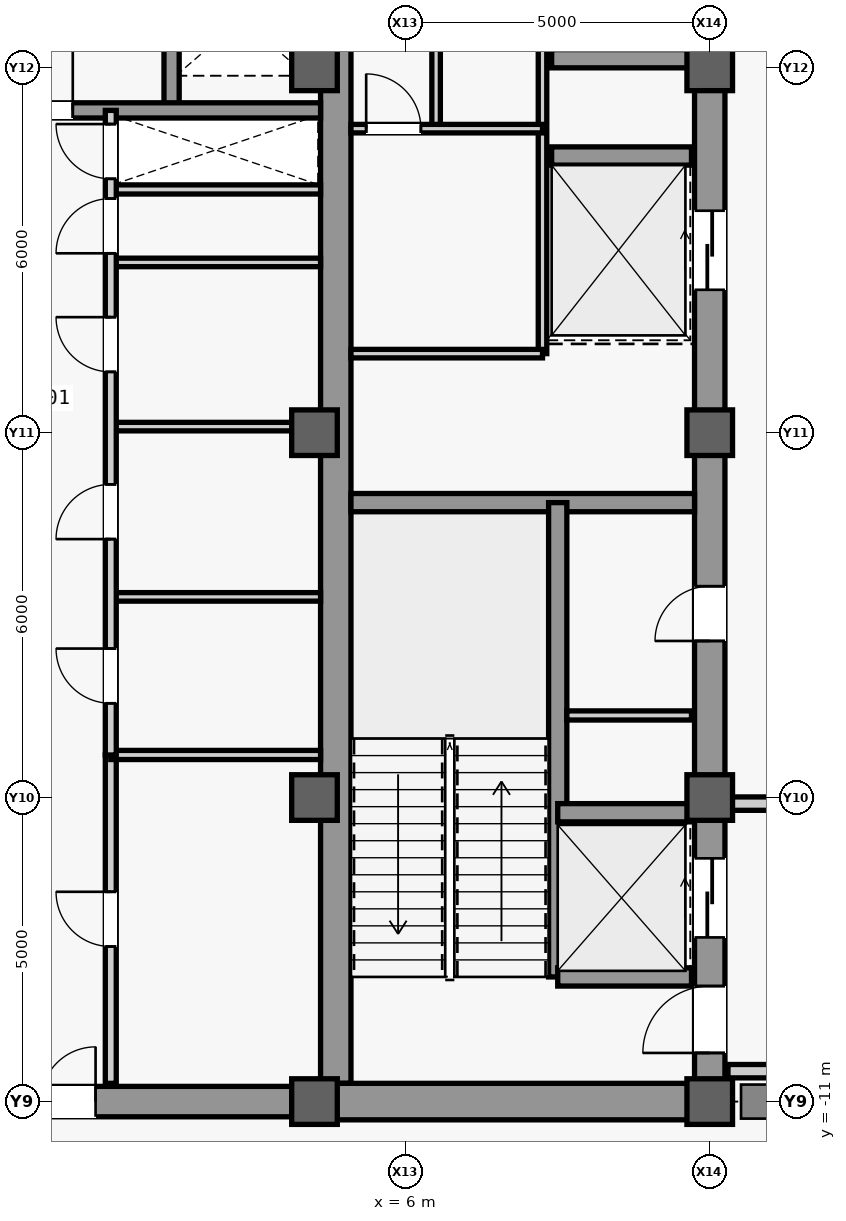
"""IFC4 building model, lengths in metres.
Left out: names, types, materials, properties, quantities, classifications, styles, units other than length and angle.
Written with IfcOpenShell. Run it as: python <this file> out.ifc"""

import sys

from ifc_helpers import new_model, si_unit, direction, frame, frame_2d, origin, origin_2d, place, context, subcontext, project, spatial, rectangle, extrude, source, transform, mapped, element, fill, save


model = new_model("IFC4")
c1 = context("Model", 3, precision=1e-05, world=origin(), true_north=direction((0.0, 1.0)))
c2 = subcontext(c1, "Body", "Model", "MODEL_VIEW")
j1 = project(units=[si_unit("LENGTHUNIT", "METRE"), si_unit("PLANEANGLEUNIT", "RADIAN")], contexts=[c1])
p1 = place(None, origin())
s1 = spatial("IfcSite", under=j1, at=p1, CompositionType="ELEMENT")
p2 = place(p1, origin())
s2 = spatial("IfcBuilding", under=s1, at=p2, CompositionType="ELEMENT")
p3 = place(p2, frame((0.0, 0.0, 268.3)))
s3 = spatial("IfcBuildingStorey", under=s2, at=p3, CompositionType="ELEMENT", Elevation=268.3)
m1 = source(origin(), c2, "Body", "SweptSolid", [
    extrude(rectangle(XDim=22.0, YDim=0.5, at=frame_2d((11.0, 0.0))), origin(), (0.0, 0.0, 1.0), 4.98),
])
p4 = place(p3, frame((11.0, -11.0, 0.0), z_axis=(0.0, 0.0, 1.0), x_axis=(0.0, 1.0, 0.0)))
e1 = element("IfcWall", 1, at=p4, inside=s3, PredefinedType="SHEAR", context=c2, shape_type="MappedRepresentation", body=[
    mapped(m1, transform((0.0, 0.0, 0.0), scale=1.0)),
])
m2 = source(origin(), c2, "Body", "SweptSolid", [
    extrude(rectangle(XDim=1.1, YDim=2.2, at=frame_2d((0.55, 1.1))), frame((0.0, 0.26, 0.0), z_axis=(0.0, -1.0, 0.0), x_axis=(1.0, 0.0, 0.0)), (0.0, 0.0, 1.0), 0.52),
])
p5 = place(p4, frame((0.8, 0.0, 0.0)))
e2 = element("IfcOpeningElement", 2, at=p5, cuts=e1, PredefinedType="OPENING", context=c2, shape_type="MappedRepresentation", body=[
    mapped(m2, transform((0.0, 0.0, 0.0), scale=1.0)),
])
m3 = source(origin(), c2, "Body", "SweptSolid", [
    extrude(rectangle(XDim=0.9, YDim=2.15, at=frame_2d((0.45, 1.075))), frame((0.0, 0.26, 0.0), z_axis=(0.0, -1.0, 0.0), x_axis=(1.0, 0.0, 0.0)), (0.0, 0.0, 1.0), 0.52),
])
p6 = place(p4, frame((7.575, 0.0, 0.0)))
e3 = element("IfcOpeningElement", 3, at=p6, cuts=e1, PredefinedType="OPENING", context=c2, shape_type="MappedRepresentation", body=[
    mapped(m3, transform((0.0, 0.0, 0.0), scale=1.0)),
])
m4 = source(origin(), c2, "Body", "SweptSolid", [
    extrude(rectangle(XDim=1.3, YDim=2.3, at=frame_2d((0.65, 1.15))), frame((0.0, 0.26, 0.0), z_axis=(0.0, -1.0, 0.0), x_axis=(1.0, 0.0, 0.0)), (0.0, 0.0, 1.0), 0.52),
])
p7 = place(p4, frame((2.7, 0.0, 0.0)))
e4 = element("IfcOpeningElement", 4, at=p7, cuts=e1, PredefinedType="OPENING", context=c2, shape_type="MappedRepresentation", body=[
    mapped(m4, transform((0.0, 0.0, 0.0), scale=1.0)),
])
p8 = place(p4, frame((13.35, 0.0, 0.0)))
e5 = element("IfcOpeningElement", 5, at=p8, cuts=e1, PredefinedType="OPENING", context=c2, shape_type="MappedRepresentation", body=[
    mapped(m4, transform((0.0, 0.0, 0.0), scale=1.0)),
])
m5 = source(origin(), c2, "Body", "SweptSolid", [
    extrude(rectangle(XDim=21.4, YDim=0.5, at=frame_2d((10.7, 0.0))), origin(), (0.0, 0.0, 1.0), 4.98),
])
p9 = place(p3, frame((4.85, -10.7, 0.0), z_axis=(0.0, 0.0, 1.0), x_axis=(0.0, 1.0, 0.0)))
e6 = element("IfcWall", 6, at=p9, inside=s3, PredefinedType="SHEAR", context=c2, shape_type="MappedRepresentation", body=[
    mapped(m5, transform((0.0, 0.0, 0.0), scale=1.0)),
])
m6 = source(origin(), c2, "Body", "SweptSolid", [
    extrude(rectangle(XDim=5.9, YDim=0.6, at=frame_2d((2.95, 0.0))), origin(), (0.0, 0.0, 1.0), 4.98),
])
p10 = place(p3, frame((4.85, -11.0, 0.0), z_axis=(0.0, 0.0, 1.0), x_axis=(1.0, 0.0, 0.0)))
e7 = element("IfcWall", 7, at=p10, inside=s3, PredefinedType="SHEAR", context=c2, shape_type="MappedRepresentation", body=[
    mapped(m6, transform((0.0, 0.0, 0.0), scale=1.0)),
])
m7 = source(origin(), c2, "Body", "SweptSolid", [
    extrude(rectangle(XDim=5.65, YDim=0.3, at=frame_2d((2.825, 0.0))), origin(), (0.0, 0.0, 1.0), 4.98),
])
p11 = place(p3, frame((5.1, -1.15, 0.0), z_axis=(0.0, 0.0, 1.0), x_axis=(1.0, 0.0, 0.0)))
e8 = element("IfcWall", 8, at=p11, inside=s3, PredefinedType="SHEAR", context=c2, shape_type="MappedRepresentation", body=[
    mapped(m7, transform((0.0, 0.0, 0.0), scale=1.0)),
])
m8 = source(origin(), c2, "Body", "SweptSolid", [
    extrude(rectangle(XDim=9.2, YDim=0.5, at=frame_2d((4.6, 0.0))), origin(), (0.0, 0.0, 1.0), 4.98),
])
p12 = place(p3, frame((-4.6, -11.0, 0.0), z_axis=(0.0, 0.0, 1.0), x_axis=(1.0, 0.0, 0.0)))
e9 = element("IfcWall", 9, at=p12, inside=s3, PredefinedType="SHEAR", context=c2, shape_type="MappedRepresentation", body=[
    mapped(m8, transform((0.0, 0.0, 0.0), scale=1.0)),
])
m9 = source(origin(), c2, "Body", "SweptSolid", [
    extrude(rectangle(XDim=1.8, YDim=2.25, at=frame_2d((0.9, 1.125))), frame((0.0, 0.26, 0.0), z_axis=(0.0, -1.0, 0.0), x_axis=(1.0, 0.0, 0.0)), (0.0, 0.0, 1.0), 0.52),
])
p13 = place(p12, frame((3.7, 0.0, 0.0)))
e10 = element("IfcOpeningElement", 10, at=p13, cuts=e9, PredefinedType="OPENING", context=c2, shape_type="MappedRepresentation", body=[
    mapped(m9, transform((0.0, 0.0, 0.0), scale=1.0)),
])
m10 = source(origin(), c2, "Body", "SweptSolid", [
    extrude(rectangle(XDim=0.75, YDim=0.75, at=origin_2d()), origin(), (0.0, 0.0, 1.0), 5.2),
])
for number, where, z_axis, x_axis in (
    (11, (4.5, -11.0, 0.0), (0.0, 0.0, 1.0), (1.0, 0.0, 0.0)),
    (12, (4.5, -6.0, 0.0), (0.0, 0.0, 1.0), (1.0, 0.0, 0.0)),
    (13, (4.5, 0.0, 0.0), (0.0, 0.0, 1.0), (1.0, 0.0, 0.0)),
    (14, (4.5, 6.0, 0.0), (0.0, 0.0, 1.0), (1.0, 0.0, 0.0)),
    (15, (11.0, -11.0, 0.0), (0.0, 0.0, 1.0), (1.0, 0.0, 0.0)),
    (16, (11.0, -6.0, 0.0), (0.0, 0.0, 1.0), (1.0, 0.0, 0.0)),
    (17, (11.0, 0.0, 0.0), (0.0, 0.0, 1.0), (1.0, 0.0, 0.0)),
    (18, (11.0, 6.0, 0.0), (0.0, 0.0, 1.0), (1.0, 0.0, 0.0)),
):
    element("IfcColumn", number, at=place(p3, frame(where, z_axis=z_axis, x_axis=x_axis)), inside=s3, PredefinedType="COLUMN", context=c2, shape_type="MappedRepresentation", body=[
        mapped(m10, transform((0.0, 0.0, 0.0), scale=1.0)),
    ])
m11 = source(origin(), c2, "Body", "SweptSolid", [
    extrude(rectangle(XDim=7.8, YDim=0.3, at=frame_2d((3.9, 0.0))), origin(), (0.0, 0.0, 1.0), 4.98),
])
p14 = place(p3, frame((8.5, -8.95, 0.0), z_axis=(0.0, 0.0, 1.0), x_axis=(0.0, 1.0, 0.0)))
e19 = element("IfcWall", 19, at=p14, inside=s3, PredefinedType="SHEAR", context=c2, shape_type="MappedRepresentation", body=[
    mapped(m11, transform((0.0, 0.0, 0.0), scale=1.0)),
])
m12 = source(origin(), c2, "Body", "SweptSolid", [
    extrude(rectangle(XDim=2.2, YDim=0.3, at=frame_2d((1.1, 0.0))), origin(), (0.0, 0.0, 1.0), 4.98),
])
for number, where, z_axis, x_axis in (
    (20, (8.5, -8.95, 0.0), (0.0, 0.0, 1.0), (1.0, 0.0, 0.0)),
    (21, (8.5, -6.25, 0.0), (0.0, 0.0, 1.0), (1.0, 0.0, 0.0)),
):
    element("IfcWall", number, at=place(p3, frame(where, z_axis=z_axis, x_axis=x_axis)), inside=s3, PredefinedType="SHEAR", context=c2, shape_type="MappedRepresentation", body=[
        mapped(m12, transform((0.0, 0.0, 0.0), scale=1.0)),
    ])
m13 = source(origin(), c2, "Body", "SweptSolid", [
    extrude(rectangle(XDim=2.3, YDim=0.3, at=frame_2d((1.15, 0.0))), origin(), (0.0, 0.0, 1.0), 4.98),
])
for number, where, z_axis, x_axis in (
    (22, (8.4, 4.55, 0.0), (0.0, 0.0, 1.0), (1.0, 0.0, 0.0)),
    (23, (8.4, 6.15, 0.0), (0.0, 0.0, 1.0), (1.0, 0.0, 0.0)),
):
    element("IfcWall", number, at=place(p3, frame(where, z_axis=z_axis, x_axis=x_axis)), inside=s3, PredefinedType="SHEAR", context=c2, shape_type="MappedRepresentation", body=[
        mapped(m13, transform((0.0, 0.0, 0.0), scale=1.0)),
    ])
m14 = source(origin(), c2, "Body", "SweptSolid", [
    extrude(rectangle(XDim=2.05, YDim=0.15, at=frame_2d((1.025, 0.0))), origin(), (0.0, 0.0, 1.0), 4.98),
])
p15 = place(p3, frame((8.65, -4.65, 0.0), z_axis=(0.0, 0.0, 1.0), x_axis=(1.0, 0.0, 0.0)))
e24 = element("IfcWall", 24, at=p15, inside=s3, PredefinedType="PARTITIONING", context=c2, shape_type="MappedRepresentation", body=[
    mapped(m14, transform((0.0, 0.0, 0.0), scale=1.0)),
])
m15 = source(origin(), c2, "Body", "SweptSolid", [
    extrude(rectangle(XDim=9.4, YDim=0.14, at=frame_2d((4.7, 0.0))), origin(), (0.0, 0.0, 1.0), 4.98),
])
p16 = place(p3, frame((8.25, 1.3, 0.0), z_axis=(0.0, 0.0, 1.0), x_axis=(0.0, 1.0, 0.0)))
e25 = element("IfcWall", 25, at=p16, inside=s3, PredefinedType="PARTITIONING", context=c2, shape_type="MappedRepresentation", body=[
    mapped(m15, transform((0.0, 0.0, 0.0), scale=1.0)),
])
m16 = source(origin(), c2, "Body", "SweptSolid", [
    extrude(rectangle(XDim=3.15, YDim=0.14, at=frame_2d((1.575, 0.0))), origin(), (0.0, 0.0, 1.0), 4.98),
])
p17 = place(p3, frame((5.1, 1.3, 0.0), z_axis=(0.0, 0.0, 1.0), x_axis=(1.0, 0.0, 0.0)))
e26 = element("IfcWall", 26, at=p17, inside=s3, PredefinedType="PARTITIONING", context=c2, shape_type="MappedRepresentation", body=[
    mapped(m16, transform((0.0, 0.0, 0.0), scale=1.0)),
])
m17 = source(origin(), c2, "Body", "SweptSolid", [
    extrude(rectangle(XDim=5.7, YDim=0.14, at=frame_2d((2.85, 0.0))), origin(), (0.0, 0.0, 1.0), 4.98),
])
p18 = place(p3, frame((6.5, 5.0, 0.0), z_axis=(0.0, 0.0, 1.0), x_axis=(0.0, 1.0, 0.0)))
e27 = element("IfcWall", 27, at=p18, inside=s3, PredefinedType="PARTITIONING", context=c2, shape_type="MappedRepresentation", body=[
    mapped(m17, transform((0.0, 0.0, 0.0), scale=1.0)),
])
m18 = source(origin(), c2, "Body", "SweptSolid", [
    extrude(rectangle(XDim=0.9, YDim=2.15, at=frame_2d((0.45, 1.075))), frame((0.0, 0.08, 0.0), z_axis=(0.0, -1.0, 0.0), x_axis=(1.0, 0.0, 0.0)), (0.0, 0.0, 1.0), 0.16),
])
p19 = place(p18, frame((2.05, 0.0, 0.0)))
e28 = element("IfcOpeningElement", 28, at=p19, cuts=e27, PredefinedType="OPENING", context=c2, shape_type="MappedRepresentation", body=[
    mapped(m18, transform((0.0, 0.0, 0.0), scale=1.0)),
])
p20 = place(p3, frame((5.1, 5.0, 0.0), z_axis=(0.0, 0.0, 1.0), x_axis=(1.0, 0.0, 0.0)))
e29 = element("IfcWall", 29, at=p20, inside=s3, PredefinedType="PARTITIONING", context=c2, shape_type="MappedRepresentation", body=[
    mapped(m16, transform((0.0, 0.0, 0.0), scale=1.0)),
])
p21 = place(p20, frame((0.25, 0.0, 0.0)))
e30 = element("IfcOpeningElement", 30, at=p21, cuts=e29, PredefinedType="OPENING", context=c2, shape_type="MappedRepresentation", body=[
    mapped(m18, transform((0.0, 0.0, 0.0), scale=1.0)),
])
m19 = source(origin(), c2, "Body", "SweptSolid", [
    extrude(rectangle(XDim=4.05, YDim=0.22, at=frame_2d((2.025, 0.0))), origin(), (0.0, 0.0, 1.0), 4.98),
])
p22 = place(p3, frame((11.3, -10.5, 0.0), z_axis=(0.0, 0.0, 1.0), x_axis=(1.0, 0.0, 0.0)))
e31 = element("IfcWall", 31, at=p22, inside=s3, PredefinedType="PARTITIONING", context=c2, shape_type="MappedRepresentation", body=[
    mapped(m19, transform((0.0, 0.0, 0.0), scale=1.0)),
])
m20 = source(origin(), c2, "Body", "SweptSolid", [
    extrude(rectangle(XDim=4.05, YDim=0.22, at=frame_2d((2.025, 0.0))), origin(), (0.0, 0.0, 1.0), 4.285),
])
p23 = place(p3, frame((11.3, -6.1, 0.0), z_axis=(0.0, 0.0, 1.0), x_axis=(1.0, 0.0, 0.0)))
e32 = element("IfcWall", 32, at=p23, inside=s3, PredefinedType="PARTITIONING", context=c2, shape_type="MappedRepresentation", body=[
    mapped(m20, transform((0.0, 0.0, 0.0), scale=1.0)),
])
m21 = source(origin(), c2, "Body", "SweptSolid", [
    extrude(rectangle(XDim=3.45, YDim=0.15, at=frame_2d((1.725, 0.0))), origin(), (0.0, 0.0, 1.0), 4.98),
])
p24 = place(p3, frame((1.15, 4.0, 0.0), z_axis=(0.0, 0.0, 1.0), x_axis=(1.0, 0.0, 0.0)))
e33 = element("IfcWall", 33, at=p24, inside=s3, PredefinedType="PARTITIONING", context=c2, shape_type="MappedRepresentation", body=[
    mapped(m21, transform((0.0, 0.0, 0.0), scale=1.0)),
])
m22 = source(origin(), c2, "Body", "SweptSolid", [
    extrude(rectangle(XDim=5.4, YDim=0.18, at=frame_2d((2.7, 0.0))), origin(), (0.0, 0.0, 1.0), 4.98),
])
p25 = place(p3, frame((1.15, -10.7, 0.0), z_axis=(0.0, 0.0, 1.0), x_axis=(0.0, 1.0, 0.0)))
e34 = element("IfcWall", 34, at=p25, inside=s3, PredefinedType="PARTITIONING", context=c2, shape_type="MappedRepresentation", body=[
    mapped(m22, transform((0.0, 0.0, 0.0), scale=1.0)),
])
m23 = source(origin(), c2, "Body", "SweptSolid", [
    extrude(rectangle(XDim=0.9, YDim=2.15, at=frame_2d((0.45, 1.075))), frame((0.0, 0.1, 0.0), z_axis=(0.0, -1.0, 0.0), x_axis=(1.0, 0.0, 0.0)), (0.0, 0.0, 1.0), 0.2),
])
p26 = place(p25, frame((2.25, 0.0, 0.0)))
e35 = element("IfcOpeningElement", 35, at=p26, cuts=e34, PredefinedType="OPENING", context=c2, shape_type="MappedRepresentation", body=[
    mapped(m23, transform((0.0, 0.0, 0.0), scale=1.0)),
])
p27 = place(p3, frame((1.15, -5.3, 0.0), z_axis=(0.0, 0.0, 1.0), x_axis=(1.0, 0.0, 0.0)))
e36 = element("IfcWall", 36, at=p27, inside=s3, PredefinedType="PARTITIONING", context=c2, shape_type="MappedRepresentation", body=[
    mapped(m21, transform((0.0, 0.0, 0.0), scale=1.0)),
])
m24 = source(origin(), c2, "Body", "SweptSolid", [
    extrude(rectangle(XDim=5.4, YDim=0.25, at=frame_2d((2.7, 0.0))), origin(), (0.0, 0.0, 1.0), 4.98),
])
p28 = place(p3, frame((2.15, 5.3, 0.0), z_axis=(0.0, 0.0, 1.0), x_axis=(0.0, 1.0, 0.0)))
e37 = element("IfcWall", 37, at=p28, inside=s3, PredefinedType="SHEAR", context=c2, shape_type="MappedRepresentation", body=[
    mapped(m24, transform((0.0, 0.0, 0.0), scale=1.0)),
])
m25 = source(origin(), c2, "Body", "SweptSolid", [
    extrude(rectangle(XDim=9.2, YDim=0.25, at=frame_2d((4.6, 0.0))), origin(), (0.0, 0.0, 1.0), 4.98),
])
p29 = place(p3, frame((-4.6, 5.3, 0.0), z_axis=(0.0, 0.0, 1.0), x_axis=(1.0, 0.0, 0.0)))
e38 = element("IfcWall", 38, at=p29, inside=s3, PredefinedType="SHEAR", context=c2, shape_type="MappedRepresentation", body=[
    mapped(m25, transform((0.0, 0.0, 0.0), scale=1.0)),
])
m26 = source(origin(), c2, "Body", "SweptSolid", [
    extrude(rectangle(XDim=1.05, YDim=2.2, at=frame_2d((0.525, 1.1))), frame((0.0, 0.135, 0.0), z_axis=(0.0, -1.0, 0.0), x_axis=(1.0, 0.0, 0.0)), (0.0, 0.0, 1.0), 0.27),
])
p30 = place(p29, frame((4.075, 0.0, 0.0)))
e39 = element("IfcOpeningElement", 39, at=p30, cuts=e38, PredefinedType="OPENING", context=c2, shape_type="MappedRepresentation", body=[
    mapped(m26, transform((0.0, 0.0, 0.0), scale=1.0)),
])
m27 = source(origin(), c2, "Body", "SweptSolid", [
    extrude(rectangle(XDim=3.45, YDim=0.14, at=frame_2d((1.725, 0.0))), origin(), (0.0, 0.0, 1.0), 4.98),
])
p31 = place(p3, frame((1.15, -2.7, 0.0), z_axis=(0.0, 0.0, 1.0), x_axis=(1.0, 0.0, 0.0)))
e40 = element("IfcWall", 40, at=p31, inside=s3, PredefinedType="PARTITIONING", context=c2, shape_type="MappedRepresentation", body=[
    mapped(m27, transform((0.0, 0.0, 0.0), scale=1.0)),
])
m28 = source(origin(), c2, "Body", "SweptSolid", [
    extrude(rectangle(XDim=3.45, YDim=0.14, at=frame_2d((1.725, 0.0))), origin(), (0.0, 0.0, 1.0), 4.285),
])
p32 = place(p3, frame((1.15, 0.1, 0.0), z_axis=(0.0, 0.0, 1.0), x_axis=(1.0, 0.0, 0.0)))
e41 = element("IfcWall", 41, at=p32, inside=s3, PredefinedType="PARTITIONING", context=c2, shape_type="MappedRepresentation", body=[
    mapped(m28, transform((0.0, 0.0, 0.0), scale=1.0)),
])
p33 = place(p3, frame((1.15, 2.8, 0.0), z_axis=(0.0, 0.0, 1.0), x_axis=(1.0, 0.0, 0.0)))
e42 = element("IfcWall", 42, at=p33, inside=s3, PredefinedType="PARTITIONING", context=c2, shape_type="MappedRepresentation", body=[
    mapped(m27, transform((0.0, 0.0, 0.0), scale=1.0)),
])
m29 = source(origin(), c2, "Body", "SweptSolid", [
    extrude(rectangle(XDim=10.6, YDim=0.18, at=frame_2d((5.3, 0.0))), origin(), (0.0, 0.0, 1.0), 4.98),
])
p34 = place(p3, frame((1.15, -5.3, 0.0), z_axis=(0.0, 0.0, 1.0), x_axis=(0.0, 1.0, 0.0)))
e43 = element("IfcWall", 43, at=p34, inside=s3, PredefinedType="PARTITIONING", context=c2, shape_type="MappedRepresentation", body=[
    mapped(m29, transform((0.0, 0.0, 0.0), scale=1.0)),
])
p35 = place(p34, frame((0.85, 0.0, 0.0)))
e44 = element("IfcOpeningElement", 44, at=p35, cuts=e43, PredefinedType="OPENING", context=c2, shape_type="MappedRepresentation", body=[
    mapped(m23, transform((0.0, 0.0, 0.0), scale=1.0)),
])
p36 = place(p34, frame((3.55, 0.0, 0.0)))
e45 = element("IfcOpeningElement", 45, at=p36, cuts=e43, PredefinedType="OPENING", context=c2, shape_type="MappedRepresentation", body=[
    mapped(m23, transform((0.0, 0.0, 0.0), scale=1.0)),
])
p37 = place(p34, frame((6.3, 0.0, 0.0)))
e46 = element("IfcOpeningElement", 46, at=p37, cuts=e43, PredefinedType="OPENING", context=c2, shape_type="MappedRepresentation", body=[
    mapped(m23, transform((0.0, 0.0, 0.0), scale=1.0)),
])
p38 = place(p34, frame((8.25, 0.0, 0.0)))
e47 = element("IfcOpeningElement", 47, at=p38, cuts=e43, PredefinedType="OPENING", context=c2, shape_type="MappedRepresentation", body=[
    mapped(m23, transform((0.0, 0.0, 0.0), scale=1.0)),
])
p39 = place(p34, frame((9.475, 0.0, 0.0)))
e48 = element("IfcOpeningElement", 48, at=p39, cuts=e43, PredefinedType="OPENING", context=c2, shape_type="MappedRepresentation", body=[
    mapped(m23, transform((0.0, 0.0, 0.0), scale=1.0)),
])
m30 = source(origin(), c2, "Body", "SweptSolid", [
    extrude(rectangle(XDim=1.1, YDim=2.2, at=frame_2d((0.55, 1.1))), frame((0.0, 0.025, 0.0), z_axis=(0.0, -1.0, 0.0), x_axis=(1.0, 0.0, 0.0)), (0.0, 0.0, 1.0), 0.05),
])
p40 = place(p5, origin())
e49 = element("IfcDoor", 49, at=p40, inside=s3, OperationType="SINGLE_SWING_LEFT", PredefinedType="DOOR", context=c2, shape_type="MappedRepresentation", body=[
    mapped(m30, transform((0.0, 0.0, 0.0), scale=1.0)),
])
fill(e2, e49)
m31 = source(origin(), c2, "Body", "SweptSolid", [
    extrude(rectangle(XDim=0.9, YDim=2.15, at=frame_2d((0.45, 1.075))), frame((0.0, 0.025, 0.0), z_axis=(0.0, -1.0, 0.0), x_axis=(1.0, 0.0, 0.0)), (0.0, 0.0, 1.0), 0.05),
])
p41 = place(p6, origin())
e50 = element("IfcDoor", 50, at=p41, inside=s3, OperationType="SINGLE_SWING_LEFT", PredefinedType="DOOR", context=c2, shape_type="MappedRepresentation", body=[
    mapped(m31, transform((0.0, 0.0, 0.0), scale=1.0)),
])
fill(e3, e50)
p42 = place(p21, origin())
e51 = element("IfcDoor", 51, at=p42, inside=s3, OperationType="SINGLE_SWING_LEFT", PredefinedType="DOOR", context=c2, shape_type="MappedRepresentation", body=[
    mapped(m31, transform((0.0, 0.0, 0.0), scale=1.0)),
])
fill(e30, e51)
p43 = place(p26, origin())
e52 = element("IfcDoor", 52, at=p43, inside=s3, OperationType="SINGLE_SWING_RIGHT", PredefinedType="DOOR", context=c2, shape_type="MappedRepresentation", body=[
    mapped(m31, transform((0.0, 0.0, 0.0), scale=1.0)),
])
fill(e35, e52)
m32 = source(origin(), c2, "Body", "SweptSolid", [
    extrude(rectangle(XDim=1.8, YDim=2.25, at=frame_2d((0.9, 1.125))), frame((0.0, 0.025, 0.0), z_axis=(0.0, -1.0, 0.0), x_axis=(1.0, 0.0, 0.0)), (0.0, 0.0, 1.0), 0.05),
])
p44 = place(p13, origin())
e53 = element("IfcDoor", 53, at=p44, inside=s3, OperationType="SINGLE_SWING_LEFT", PredefinedType="DOOR", context=c2, shape_type="MappedRepresentation", body=[
    mapped(m32, transform((0.0, 0.0, 0.0), scale=1.0)),
])
fill(e10, e53)
m33 = source(origin(), c2, "Body", "SweptSolid", [
    extrude(rectangle(XDim=1.05, YDim=2.2, at=frame_2d((0.525, 1.1))), frame((0.0, 0.025, 0.0), z_axis=(0.0, -1.0, 0.0), x_axis=(1.0, 0.0, 0.0)), (0.0, 0.0, 1.0), 0.05),
])
p45 = place(p30, origin())
e54 = element("IfcDoor", 54, at=p45, inside=s3, OperationType="SINGLE_SWING_RIGHT", PredefinedType="DOOR", context=c2, shape_type="MappedRepresentation", body=[
    mapped(m33, transform((0.0, 0.0, 0.0), scale=1.0)),
])
fill(e39, e54)
p46 = place(p35, origin())
e55 = element("IfcDoor", 55, at=p46, inside=s3, OperationType="SINGLE_SWING_RIGHT", PredefinedType="DOOR", context=c2, shape_type="MappedRepresentation", body=[
    mapped(m31, transform((0.0, 0.0, 0.0), scale=1.0)),
])
fill(e44, e55)
p47 = place(p36, origin())
e56 = element("IfcDoor", 56, at=p47, inside=s3, OperationType="SINGLE_SWING_LEFT", PredefinedType="DOOR", context=c2, shape_type="MappedRepresentation", body=[
    mapped(m31, transform((0.0, 0.0, 0.0), scale=1.0)),
])
fill(e45, e56)
p48 = place(p37, origin())
e57 = element("IfcDoor", 57, at=p48, inside=s3, OperationType="SINGLE_SWING_RIGHT", PredefinedType="DOOR", context=c2, shape_type="MappedRepresentation", body=[
    mapped(m31, transform((0.0, 0.0, 0.0), scale=1.0)),
])
fill(e46, e57)
p49 = place(p38, origin())
e58 = element("IfcDoor", 58, at=p49, inside=s3, OperationType="SINGLE_SWING_LEFT", PredefinedType="DOOR", context=c2, shape_type="MappedRepresentation", body=[
    mapped(m31, transform((0.0, 0.0, 0.0), scale=1.0)),
])
fill(e47, e58)
p50 = place(p39, origin())
e59 = element("IfcDoor", 59, at=p50, inside=s3, OperationType="SINGLE_SWING_RIGHT", PredefinedType="DOOR", context=c2, shape_type="MappedRepresentation", body=[
    mapped(m31, transform((0.0, 0.0, 0.0), scale=1.0)),
])
fill(e48, e59)
m34 = source(origin(), c2, "Body", "SweptSolid", [
    extrude(rectangle(XDim=1.3, YDim=2.3, at=frame_2d((0.65, 1.15))), frame((0.0, 0.025, 0.0), z_axis=(0.0, -1.0, 0.0), x_axis=(1.0, 0.0, 0.0)), (0.0, 0.0, 1.0), 0.05),
])
p51 = place(p7, origin())
e60 = element("IfcDoor", 60, at=p51, inside=s3, OperationType="SLIDING_TO_LEFT", PredefinedType="DOOR", context=c2, shape_type="MappedRepresentation", body=[
    mapped(m34, transform((0.0, 0.0, 0.0), scale=1.0)),
])
fill(e4, e60)
p52 = place(p8, origin())
e61 = element("IfcDoor", 61, at=p52, inside=s3, OperationType="SLIDING_TO_LEFT", PredefinedType="DOOR", context=c2, shape_type="MappedRepresentation", body=[
    mapped(m34, transform((0.0, 0.0, 0.0), scale=1.0)),
])
fill(e5, e61)
save(model, sys.argv[1])
